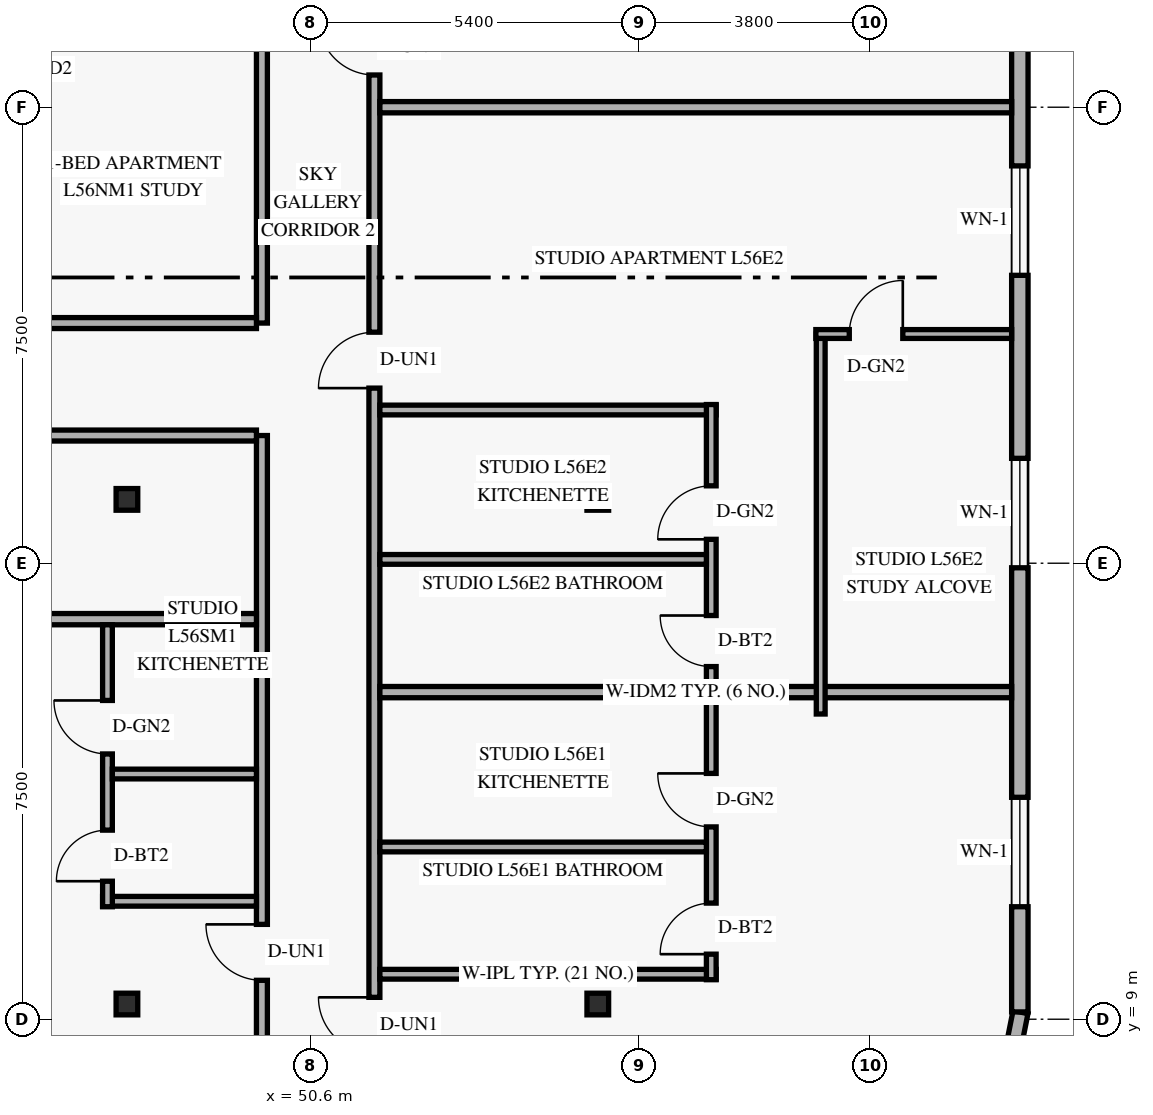
"""IFC4 building model, lengths in metres.
Left out: names, types, materials, properties, quantities, classifications, styles, units other than length and angle.
Written with IfcOpenShell. Run it as: python <this file> out.ifc"""

import sys

from ifc_helpers import new_model, si_unit, direction, frame, frame_2d, origin, origin_2d, place, context, subcontext, project, spatial, rectangle, hollow_rectangle, extrude, element, fill, save


model = new_model("IFC4")
c1 = context("Model", 3, precision=1e-05, world=origin(), true_north=direction((0.0, 1.0)))
c2 = subcontext(c1, "Body", "Model", "MODEL_VIEW")
j1 = project(units=[si_unit("LENGTHUNIT", "METRE"), si_unit("PLANEANGLEUNIT", "RADIAN")], contexts=[c1])
p1 = place(None, origin())
s1 = spatial("IfcSite", under=j1, at=p1, CompositionType="ELEMENT")
p2 = place(p1, origin())
s2 = spatial("IfcBuilding", under=s1, at=p2, CompositionType="ELEMENT")
p3 = place(p2, frame((0.0, 0.0, 216.6)))
s3 = spatial("IfcBuildingStorey", under=s2, at=p3, CompositionType="ELEMENT", Elevation=216.6)
for number, where, z_axis, x_axis in (
    (1, (47.517, 9.25, 0.0), (0.035, 0.0, 0.999), (0.0, 1.0, 0.0)),
    (2, (47.517, 17.55, 0.0), (0.035, 0.0, 0.999), (0.0, 1.0, 0.0)),
):
    element("IfcColumn", number, at=place(p3, frame(where, z_axis=z_axis, x_axis=x_axis)), inside=s3, PredefinedType="COLUMN", context=c2, shape_type="SweptSolid", body=[
        extrude(hollow_rectangle(XDim=0.356, YDim=0.356, WallThickness=0.016, at=origin_2d()), origin(), (0.0, 0.0, 1.0), 3.602),
    ])
for number, where, z_axis, x_axis in (
    (3, (55.219, 9.25, 0.0), (0.058, 0.0, 0.998), (0.0, 1.0, 0.0)),
    (4, (55.219, 17.55, 0.0), (0.058, 0.0, 0.998), (0.0, 1.0, 0.0)),
):
    element("IfcColumn", number, at=place(p3, frame(where, z_axis=z_axis, x_axis=x_axis)), inside=s3, PredefinedType="COLUMN", context=c2, shape_type="SweptSolid", body=[
        extrude(hollow_rectangle(XDim=0.356, YDim=0.356, WallThickness=0.016, at=origin_2d()), origin(), (0.0, 0.0, 1.0), 3.606),
    ])
p4 = place(p3, frame((62.005, 7.754, 0.0), z_axis=(0.0, 0.0, 1.0), x_axis=(0.195135625965, 0.9807762678, 0.0)))
e5 = element("IfcWall", 5, at=p4, inside=s3, PredefinedType="SOLIDWALL", context=c2, shape_type="SweptSolid", body=[
    extrude(rectangle(XDim=1.389, YDim=0.25, at=frame_2d((0.694, 0.0))), origin(), (0.0, 0.0, 1.0), 3.36),
])
p5 = place(p3, frame((62.265, 9.12, 0.0), z_axis=(0.0, 0.0, 1.0), x_axis=(0.0, 1.0, 0.0)))
e6 = element("IfcWall", 6, at=p5, inside=s3, PredefinedType="SOLIDWALL", context=c2, shape_type="SweptSolid", body=[
    extrude(rectangle(XDim=29.76, YDim=0.27, at=frame_2d((14.88, 0.0))), origin(), (0.0, 0.0, 1.0), 3.36),
])
p6 = place(p5, frame((1.73, 0.0, 0.85)))
e7 = element("IfcOpeningElement", 7, at=p6, cuts=e6, PredefinedType="OPENING", context=c2, shape_type="SweptSolid", body=[
    extrude(rectangle(XDim=1.8, YDim=1.6, at=frame_2d((0.9, 0.8))), frame((0.0, 0.145, 0.0), z_axis=(0.0, -1.0, 0.0), x_axis=(1.0, 0.0, 0.0)), (0.0, 0.0, 1.0), 0.29),
])
p7 = place(p5, frame((7.305, 0.0, 0.85)))
e8 = element("IfcOpeningElement", 8, at=p7, cuts=e6, PredefinedType="OPENING", context=c2, shape_type="SweptSolid", body=[
    extrude(rectangle(XDim=1.8, YDim=1.6, at=frame_2d((0.9, 0.8))), frame((0.0, 0.145, 0.0), z_axis=(0.0, -1.0, 0.0), x_axis=(1.0, 0.0, 0.0)), (0.0, 0.0, 1.0), 0.29),
])
p8 = place(p5, frame((12.115, 0.0, 0.85)))
e9 = element("IfcOpeningElement", 9, at=p8, cuts=e6, PredefinedType="OPENING", context=c2, shape_type="SweptSolid", body=[
    extrude(rectangle(XDim=1.8, YDim=1.6, at=frame_2d((0.9, 0.8))), frame((0.0, 0.145, 0.0), z_axis=(0.0, -1.0, 0.0), x_axis=(1.0, 0.0, 0.0)), (0.0, 0.0, 1.0), 0.29),
])
p9 = place(p5, frame((17.188, 0.0, 0.85)))
e10 = element("IfcOpeningElement", 10, at=p9, cuts=e6, PredefinedType="OPENING", context=c2, shape_type="SweptSolid", body=[
    extrude(rectangle(XDim=1.8, YDim=1.6, at=frame_2d((0.9, 0.8))), frame((0.0, 0.145, 0.0), z_axis=(0.0, -1.0, 0.0), x_axis=(1.0, 0.0, 0.0)), (0.0, 0.0, 1.0), 0.29),
])
p10 = place(p5, frame((21.997, 0.0, 0.85)))
e11 = element("IfcOpeningElement", 11, at=p10, cuts=e6, PredefinedType="OPENING", context=c2, shape_type="SweptSolid", body=[
    extrude(rectangle(XDim=1.8, YDim=1.6, at=frame_2d((0.9, 0.8))), frame((0.0, 0.145, 0.0), z_axis=(0.0, -1.0, 0.0), x_axis=(1.0, 0.0, 0.0)), (0.0, 0.0, 1.0), 0.29),
])
p11 = place(p5, frame((26.23, 0.0, 0.85)))
e12 = element("IfcOpeningElement", 12, at=p11, cuts=e6, PredefinedType="OPENING", context=c2, shape_type="SweptSolid", body=[
    extrude(rectangle(XDim=1.8, YDim=1.6, at=frame_2d((0.9, 0.8))), frame((0.0, 0.145, 0.0), z_axis=(0.0, -1.0, 0.0), x_axis=(1.0, 0.0, 0.0)), (0.0, 0.0, 1.0), 0.29),
])
p12 = place(p3, frame((49.8, 5.77, 0.0), z_axis=(0.0, 0.0, 1.0), x_axis=(0.0, 1.0, 0.0)))
e13 = element("IfcWall", 13, at=p12, inside=s3, PredefinedType="STANDARD", context=c2, shape_type="SweptSolid", body=[
    extrude(rectangle(XDim=12.83, YDim=0.18, at=frame_2d((6.415, 0.0))), origin(), (0.0, 0.0, 1.0), 2.803),
])
p13 = place(p12, frame((3.87, 0.0, 0.0)))
e14 = element("IfcOpeningElement", 14, at=p13, cuts=e13, PredefinedType="OPENING", context=c2, shape_type="SweptSolid", body=[
    extrude(rectangle(XDim=0.92, YDim=2.15, at=frame_2d((0.46, 1.075))), frame((0.0, 0.1, 0.0), z_axis=(0.0, -1.0, 0.0), x_axis=(1.0, 0.0, 0.0)), (0.0, 0.0, 1.0), 0.2),
])
p14 = place(p3, frame((49.8, 20.45, 0.0), z_axis=(0.0, 0.0, 1.0), x_axis=(0.0, 1.0, 0.0)))
e15 = element("IfcWall", 15, at=p14, inside=s3, PredefinedType="STANDARD", context=c2, shape_type="SweptSolid", body=[
    extrude(rectangle(XDim=21.78, YDim=0.18, at=frame_2d((10.89, 0.0))), origin(), (0.0, 0.0, 1.0), 2.803),
])
p15 = place(p14, frame((15.9, 0.0, 0.0)))
e16 = element("IfcOpeningElement", 16, at=p15, cuts=e15, PredefinedType="OPENING", context=c2, shape_type="SweptSolid", body=[
    extrude(rectangle(XDim=0.92, YDim=2.15, at=frame_2d((0.46, 1.075))), frame((0.0, 0.1, 0.0), z_axis=(0.0, -1.0, 0.0), x_axis=(1.0, 0.0, 0.0)), (0.0, 0.0, 1.0), 0.2),
])
p16 = place(p3, frame((37.64, 18.6, 0.0), z_axis=(0.0, 0.0, 1.0), x_axis=(1.0, 0.0, 0.0)))
e17 = element("IfcWall", 17, at=p16, inside=s3, PredefinedType="STANDARD", context=c2, shape_type="SweptSolid", body=[
    extrude(rectangle(XDim=12.07, YDim=0.18, at=frame_2d((6.035, 0.0))), origin(), (0.0, 0.0, 1.0), 2.803),
])
p17 = place(p3, frame((37.64, 20.45, 0.0), z_axis=(0.0, 0.0, 1.0), x_axis=(1.0, 0.0, 0.0)))
e18 = element("IfcWall", 18, at=p17, inside=s3, PredefinedType="STANDARD", context=c2, shape_type="SweptSolid", body=[
    extrude(rectangle(XDim=12.07, YDim=0.18, at=frame_2d((6.035, 0.0))), origin(), (0.0, 0.0, 1.0), 2.803),
])
p18 = place(p17, frame((0.32, 0.0, 0.0)))
e19 = element("IfcOpeningElement", 19, at=p18, cuts=e18, PredefinedType="OPENING", context=c2, shape_type="SweptSolid", body=[
    extrude(rectangle(XDim=0.92, YDim=2.15, at=frame_2d((0.46, 1.075))), frame((0.0, 0.1, 0.0), z_axis=(0.0, -1.0, 0.0), x_axis=(1.0, 0.0, 0.0)), (0.0, 0.0, 1.0), 0.2),
])
p19 = place(p3, frame((51.65, 5.77, 0.0), z_axis=(0.0, 0.0, 1.0), x_axis=(0.0, 1.0, 0.0)))
e20 = element("IfcWall", 20, at=p19, inside=s3, PredefinedType="STANDARD", context=c2, shape_type="SweptSolid", body=[
    extrude(rectangle(XDim=36.46, YDim=0.18, at=frame_2d((18.23, 0.0))), origin(), (0.0, 0.0, 1.0), 2.803),
])
p20 = place(p19, frame((2.67, 0.0, 0.0)))
e21 = element("IfcOpeningElement", 21, at=p20, cuts=e20, PredefinedType="OPENING", context=c2, shape_type="SweptSolid", body=[
    extrude(rectangle(XDim=0.92, YDim=2.15, at=frame_2d((0.46, 1.075))), frame((0.0, 0.1, 0.0), z_axis=(0.0, -1.0, 0.0), x_axis=(1.0, 0.0, 0.0)), (0.0, 0.0, 1.0), 0.2),
])
p21 = place(p19, frame((13.61, 0.0, 0.0)))
e22 = element("IfcOpeningElement", 22, at=p21, cuts=e20, PredefinedType="OPENING", context=c2, shape_type="SweptSolid", body=[
    extrude(rectangle(XDim=0.92, YDim=2.15, at=frame_2d((0.46, 1.075))), frame((0.0, 0.1, 0.0), z_axis=(0.0, -1.0, 0.0), x_axis=(1.0, 0.0, 0.0)), (0.0, 0.0, 1.0), 0.2),
])
p22 = place(p19, frame((18.76, 0.0, 0.0)))
e23 = element("IfcOpeningElement", 23, at=p22, cuts=e20, PredefinedType="OPENING", context=c2, shape_type="SweptSolid", body=[
    extrude(rectangle(XDim=0.92, YDim=2.15, at=frame_2d((0.46, 1.075))), frame((0.0, 0.1, 0.0), z_axis=(0.0, -1.0, 0.0), x_axis=(1.0, 0.0, 0.0)), (0.0, 0.0, 1.0), 0.2),
])
p23 = place(p19, frame((32.75, 0.0, 0.0)))
e24 = element("IfcOpeningElement", 24, at=p23, cuts=e20, PredefinedType="OPENING", context=c2, shape_type="SweptSolid", body=[
    extrude(rectangle(XDim=0.92, YDim=2.15, at=frame_2d((0.46, 1.075))), frame((0.0, 0.1, 0.0), z_axis=(0.0, -1.0, 0.0), x_axis=(1.0, 0.0, 0.0)), (0.0, 0.0, 1.0), 0.2),
])
p24 = place(p3, frame((51.74, 9.74, 0.0), z_axis=(0.0, 0.0, 1.0), x_axis=(1.0, 0.0, 0.0)))
e25 = element("IfcWall", 25, at=p24, inside=s3, PredefinedType="PLUMBINGWALL", context=c2, shape_type="SweptSolid", body=[
    extrude(rectangle(XDim=5.53, YDim=0.16, at=frame_2d((2.765, 0.0))), origin(), (0.0, 0.0, 1.0), 2.879),
])
p25 = place(p3, frame((57.19, 9.65, 0.0), z_axis=(0.0, 0.0, 1.0), x_axis=(0.0, 1.0, 0.0)))
e26 = element("IfcWall", 26, at=p25, inside=s3, PredefinedType="PLUMBINGWALL", context=c2, shape_type="SweptSolid", body=[
    extrude(rectangle(XDim=4.73, YDim=0.16, at=frame_2d((2.365, 0.0))), origin(), (0.0, 0.0, 1.0), 3.36),
])
p26 = place(p25, frame((0.42, 0.0, 0.0)))
e27 = element("IfcOpeningElement", 27, at=p26, cuts=e26, PredefinedType="OPENING", context=c2, shape_type="SweptSolid", body=[
    extrude(rectangle(XDim=0.84, YDim=2.12, at=frame_2d((0.42, 1.06))), frame((0.0, 0.09, 0.0), z_axis=(0.0, -1.0, 0.0), x_axis=(1.0, 0.0, 0.0)), (0.0, 0.0, 1.0), 0.18),
])
p27 = place(p25, frame((2.513, 0.0, 0.0)))
e28 = element("IfcOpeningElement", 28, at=p27, cuts=e26, PredefinedType="OPENING", context=c2, shape_type="SweptSolid", body=[
    extrude(rectangle(XDim=0.88, YDim=2.12, at=frame_2d((0.44, 1.06))), frame((0.0, 0.09, 0.0), z_axis=(0.0, -1.0, 0.0), x_axis=(1.0, 0.0, 0.0)), (0.0, 0.0, 1.0), 0.18),
])
p28 = place(p3, frame((51.74, 11.833, 0.0), z_axis=(0.0, 0.0, 1.0), x_axis=(1.0, 0.0, 0.0)))
e29 = element("IfcWall", 29, at=p28, inside=s3, PredefinedType="PLUMBINGWALL", context=c2, shape_type="SweptSolid", body=[
    extrude(rectangle(XDim=5.37, YDim=0.16, at=frame_2d((2.685, 0.0))), origin(), (0.0, 0.0, 1.0), 2.879),
])
p29 = place(p3, frame((51.74, 14.38, 0.0), z_axis=(0.0, 0.0, 1.0), x_axis=(1.0, 0.0, 0.0)))
e30 = element("IfcWall", 30, at=p29, inside=s3, PredefinedType="PARTITIONING", context=c2, shape_type="SweptSolid", body=[
    extrude(rectangle(XDim=10.39, YDim=0.185, at=frame_2d((5.195, 0.0))), origin(), (0.0, 0.0, 1.0), 2.879),
])
p30 = place(p3, frame((51.74, 19.02, 0.0), z_axis=(0.0, 0.0, 1.0), x_axis=(1.0, 0.0, 0.0)))
e31 = element("IfcWall", 31, at=p30, inside=s3, PredefinedType="PLUMBINGWALL", context=c2, shape_type="SweptSolid", body=[
    extrude(rectangle(XDim=5.53, YDim=0.16, at=frame_2d((2.765, 0.0))), origin(), (0.0, 0.0, 1.0), 2.879),
])
p31 = place(p3, frame((57.19, 14.472, 0.0), z_axis=(0.0, 0.0, 1.0), x_axis=(0.0, 1.0, 0.0)))
e32 = element("IfcWall", 32, at=p31, inside=s3, PredefinedType="PLUMBINGWALL", context=c2, shape_type="SweptSolid", body=[
    extrude(rectangle(XDim=4.638, YDim=0.16, at=frame_2d((2.319, 0.0))), origin(), (0.0, 0.0, 1.0), 3.36),
])
p32 = place(p31, frame((0.327, 0.0, 0.0)))
e33 = element("IfcOpeningElement", 33, at=p32, cuts=e32, PredefinedType="OPENING", context=c2, shape_type="SweptSolid", body=[
    extrude(rectangle(XDim=0.84, YDim=2.12, at=frame_2d((0.42, 1.06))), frame((0.0, 0.09, 0.0), z_axis=(0.0, -1.0, 0.0), x_axis=(1.0, 0.0, 0.0)), (0.0, 0.0, 1.0), 0.18),
])
p33 = place(p31, frame((2.42, 0.0, 0.0)))
e34 = element("IfcOpeningElement", 34, at=p33, cuts=e32, PredefinedType="OPENING", context=c2, shape_type="SweptSolid", body=[
    extrude(rectangle(XDim=0.88, YDim=2.12, at=frame_2d((0.44, 1.06))), frame((0.0, 0.09, 0.0), z_axis=(0.0, -1.0, 0.0), x_axis=(1.0, 0.0, 0.0)), (0.0, 0.0, 1.0), 0.18),
])
p34 = place(p3, frame((51.74, 16.563, 0.0), z_axis=(0.0, 0.0, 1.0), x_axis=(1.0, 0.0, 0.0)))
e35 = element("IfcWall", 35, at=p34, inside=s3, PredefinedType="PLUMBINGWALL", context=c2, shape_type="SweptSolid", body=[
    extrude(rectangle(XDim=5.37, YDim=0.16, at=frame_2d((2.685, 0.0))), origin(), (0.0, 0.0, 1.0), 2.879),
])
p35 = place(p3, frame((58.99, 14.02, 0.0), z_axis=(0.0, 0.0, 1.0), x_axis=(0.0, 1.0, 0.0)))
e36 = element("IfcWall", 36, at=p35, inside=s3, PredefinedType="PARTITIONING", context=c2, shape_type="SweptSolid", body=[
    extrude(rectangle(XDim=6.25, YDim=0.145, at=frame_2d((3.125, 0.0))), origin(), (0.0, 0.0, 1.0), 3.36),
])
p36 = place(p3, frame((58.91, 20.27, 0.0), z_axis=(0.0, 0.0, 1.0), x_axis=(1.0, 0.0, 0.0)))
e37 = element("IfcWall", 37, at=p36, inside=s3, PredefinedType="PARTITIONING", context=c2, shape_type="SweptSolid", body=[
    extrude(rectangle(XDim=3.22, YDim=0.145, at=frame_2d((1.61, 0.0))), origin(), (0.0, 0.0, 1.0), 3.36),
])
p37 = place(p36, frame((0.55, 0.0, 0.0)))
e38 = element("IfcOpeningElement", 38, at=p37, cuts=e37, PredefinedType="OPENING", context=c2, shape_type="SweptSolid", body=[
    extrude(rectangle(XDim=0.88, YDim=2.12, at=frame_2d((0.44, 1.06))), frame((0.0, 0.083, 0.0), z_axis=(0.0, -1.0, 0.0), x_axis=(1.0, 0.0, 0.0)), (0.0, 0.0, 1.0), 0.165),
])
p38 = place(p3, frame((51.74, 24.0, 0.0), z_axis=(0.0, 0.0, 1.0), x_axis=(1.0, 0.0, 0.0)))
e39 = element("IfcWall", 39, at=p38, inside=s3, PredefinedType="PARTITIONING", context=c2, shape_type="SweptSolid", body=[
    extrude(rectangle(XDim=10.39, YDim=0.185, at=frame_2d((5.195, 0.0))), origin(), (0.0, 0.0, 1.0), 2.879),
])
p39 = place(p3, frame((38.022, 15.58, 0.0), z_axis=(0.0, 0.0, 1.0), x_axis=(1.0, 0.0, 0.0)))
e40 = element("IfcWall", 40, at=p39, inside=s3, PredefinedType="PARTITIONING", context=c2, shape_type="SweptSolid", body=[
    extrude(rectangle(XDim=11.688, YDim=0.185, at=frame_2d((5.844, 0.0))), origin(), (0.0, 0.0, 1.0), 2.803),
])
p40 = place(p3, frame((47.18, 10.94, 0.0), z_axis=(0.0, 0.0, 1.0), x_axis=(1.0, 0.0, 0.0)))
e41 = element("IfcWall", 41, at=p40, inside=s3, PredefinedType="PLUMBINGWALL", context=c2, shape_type="SweptSolid", body=[
    extrude(rectangle(XDim=2.53, YDim=0.16, at=frame_2d((1.265, 0.0))), origin(), (0.0, 0.0, 1.0), 2.803),
])
p41 = place(p3, frame((47.26, 10.85, 0.0), z_axis=(0.0, 0.0, 1.0), x_axis=(0.0, 1.0, 0.0)))
e42 = element("IfcWall", 42, at=p41, inside=s3, PredefinedType="PLUMBINGWALL", context=c2, shape_type="SweptSolid", body=[
    extrude(rectangle(XDim=4.637, YDim=0.16, at=frame_2d((2.319, 0.0))), origin(), (0.0, 0.0, 1.0), 3.039),
])
p42 = place(p41, frame((0.42, 0.0, 0.0)))
e43 = element("IfcOpeningElement", 43, at=p42, cuts=e42, PredefinedType="OPENING", context=c2, shape_type="SweptSolid", body=[
    extrude(rectangle(XDim=0.84, YDim=2.12, at=frame_2d((0.42, 1.06))), frame((0.0, 0.09, 0.0), z_axis=(0.0, -1.0, 0.0), x_axis=(1.0, 0.0, 0.0)), (0.0, 0.0, 1.0), 0.18),
])
p43 = place(p41, frame((2.513, 0.0, 0.0)))
e44 = element("IfcOpeningElement", 44, at=p43, cuts=e42, PredefinedType="OPENING", context=c2, shape_type="SweptSolid", body=[
    extrude(rectangle(XDim=0.88, YDim=2.12, at=frame_2d((0.44, 1.06))), frame((0.0, 0.09, 0.0), z_axis=(0.0, -1.0, 0.0), x_axis=(1.0, 0.0, 0.0)), (0.0, 0.0, 1.0), 0.18),
])
p44 = place(p3, frame((47.34, 13.033, 0.0), z_axis=(0.0, 0.0, 1.0), x_axis=(1.0, 0.0, 0.0)))
e45 = element("IfcWall", 45, at=p44, inside=s3, PredefinedType="PLUMBINGWALL", context=c2, shape_type="SweptSolid", body=[
    extrude(rectangle(XDim=2.37, YDim=0.16, at=frame_2d((1.185, 0.0))), origin(), (0.0, 0.0, 1.0), 2.803),
])
p45 = place(p6, origin())
e46 = element("IfcWindow", 46, at=p45, inside=s3, PartitioningType="SINGLE_PANEL", PredefinedType="WINDOW", context=c2, shape_type="SweptSolid", body=[
    extrude(rectangle(XDim=1.8, YDim=1.6, at=frame_2d((0.9, 0.8))), frame((0.0, 0.03, 0.0), z_axis=(0.0, -1.0, 0.0), x_axis=(1.0, 0.0, 0.0)), (0.0, 0.0, 1.0), 0.06),
])
fill(e7, e46)
p46 = place(p7, origin())
e47 = element("IfcWindow", 47, at=p46, inside=s3, PartitioningType="SINGLE_PANEL", PredefinedType="WINDOW", context=c2, shape_type="SweptSolid", body=[
    extrude(rectangle(XDim=1.8, YDim=1.6, at=frame_2d((0.9, 0.8))), frame((0.0, 0.03, 0.0), z_axis=(0.0, -1.0, 0.0), x_axis=(1.0, 0.0, 0.0)), (0.0, 0.0, 1.0), 0.06),
])
fill(e8, e47)
p47 = place(p8, origin())
e48 = element("IfcWindow", 48, at=p47, inside=s3, PartitioningType="SINGLE_PANEL", PredefinedType="WINDOW", context=c2, shape_type="SweptSolid", body=[
    extrude(rectangle(XDim=1.8, YDim=1.6, at=frame_2d((0.9, 0.8))), frame((0.0, 0.03, 0.0), z_axis=(0.0, -1.0, 0.0), x_axis=(1.0, 0.0, 0.0)), (0.0, 0.0, 1.0), 0.06),
])
fill(e9, e48)
p48 = place(p20, origin())
e49 = element("IfcDoor", 49, at=p48, inside=s3, OperationType="SINGLE_SWING_RIGHT", PredefinedType="DOOR", context=c2, shape_type="SweptSolid", body=[
    extrude(rectangle(XDim=0.92, YDim=2.15, at=frame_2d((0.46, 1.075))), frame((0.0, 0.025, 0.0), z_axis=(0.0, -1.0, 0.0), x_axis=(1.0, 0.0, 0.0)), (0.0, 0.0, 1.0), 0.05),
])
fill(e21, e49)
p49 = place(p26, origin())
e50 = element("IfcDoor", 50, at=p49, inside=s3, OperationType="SINGLE_SWING_LEFT", PredefinedType="DOOR", context=c2, shape_type="SweptSolid", body=[
    extrude(rectangle(XDim=0.84, YDim=2.12, at=frame_2d((0.42, 1.06))), frame((0.0, 0.025, 0.0), z_axis=(0.0, -1.0, 0.0), x_axis=(1.0, 0.0, 0.0)), (0.0, 0.0, 1.0), 0.05),
])
fill(e27, e50)
p50 = place(p27, origin())
e51 = element("IfcDoor", 51, at=p50, inside=s3, OperationType="SINGLE_SWING_RIGHT", PredefinedType="DOOR", context=c2, shape_type="SweptSolid", body=[
    extrude(rectangle(XDim=0.88, YDim=2.12, at=frame_2d((0.44, 1.06))), frame((0.0, 0.025, 0.0), z_axis=(0.0, -1.0, 0.0), x_axis=(1.0, 0.0, 0.0)), (0.0, 0.0, 1.0), 0.05),
])
fill(e28, e51)
p51 = place(p37, origin())
e52 = element("IfcDoor", 52, at=p51, inside=s3, OperationType="SINGLE_SWING_RIGHT", PredefinedType="DOOR", context=c2, shape_type="SweptSolid", body=[
    extrude(rectangle(XDim=0.88, YDim=2.12, at=frame_2d((0.44, 1.06))), frame((0.0, 0.025, 0.0), z_axis=(0.0, -1.0, 0.0), x_axis=(1.0, 0.0, 0.0)), (0.0, 0.0, 1.0), 0.05),
])
fill(e38, e52)
p52 = place(p21, origin())
e53 = element("IfcDoor", 53, at=p52, inside=s3, OperationType="SINGLE_SWING_LEFT", PredefinedType="DOOR", context=c2, shape_type="SweptSolid", body=[
    extrude(rectangle(XDim=0.92, YDim=2.15, at=frame_2d((0.46, 1.075))), frame((0.0, 0.025, 0.0), z_axis=(0.0, -1.0, 0.0), x_axis=(1.0, 0.0, 0.0)), (0.0, 0.0, 1.0), 0.05),
])
fill(e22, e53)
p53 = place(p32, origin())
e54 = element("IfcDoor", 54, at=p53, inside=s3, OperationType="SINGLE_SWING_RIGHT", PredefinedType="DOOR", context=c2, shape_type="SweptSolid", body=[
    extrude(rectangle(XDim=0.84, YDim=2.12, at=frame_2d((0.42, 1.06))), frame((0.0, 0.025, 0.0), z_axis=(0.0, -1.0, 0.0), x_axis=(1.0, 0.0, 0.0)), (0.0, 0.0, 1.0), 0.05),
])
fill(e33, e54)
p54 = place(p33, origin())
e55 = element("IfcDoor", 55, at=p54, inside=s3, OperationType="SINGLE_SWING_LEFT", PredefinedType="DOOR", context=c2, shape_type="SweptSolid", body=[
    extrude(rectangle(XDim=0.88, YDim=2.12, at=frame_2d((0.44, 1.06))), frame((0.0, 0.025, 0.0), z_axis=(0.0, -1.0, 0.0), x_axis=(1.0, 0.0, 0.0)), (0.0, 0.0, 1.0), 0.05),
])
fill(e34, e55)
p55 = place(p22, origin())
e56 = element("IfcDoor", 56, at=p55, inside=s3, OperationType="SINGLE_SWING_RIGHT", PredefinedType="DOOR", context=c2, shape_type="SweptSolid", body=[
    extrude(rectangle(XDim=0.92, YDim=2.15, at=frame_2d((0.46, 1.075))), frame((0.0, 0.025, 0.0), z_axis=(0.0, -1.0, 0.0), x_axis=(1.0, 0.0, 0.0)), (0.0, 0.0, 1.0), 0.05),
])
fill(e23, e56)
p56 = place(p13, origin())
e57 = element("IfcDoor", 57, at=p56, inside=s3, OperationType="SINGLE_SWING_RIGHT", PredefinedType="DOOR", context=c2, shape_type="SweptSolid", body=[
    extrude(rectangle(XDim=0.92, YDim=2.15, at=frame_2d((0.46, 1.075))), frame((0.0, 0.025, 0.0), z_axis=(0.0, -1.0, 0.0), x_axis=(1.0, 0.0, 0.0)), (0.0, 0.0, 1.0), 0.05),
])
fill(e14, e57)
p57 = place(p42, origin())
e58 = element("IfcDoor", 58, at=p57, inside=s3, OperationType="SINGLE_SWING_LEFT", PredefinedType="DOOR", context=c2, shape_type="SweptSolid", body=[
    extrude(rectangle(XDim=0.84, YDim=2.12, at=frame_2d((0.42, 1.06))), frame((0.0, 0.025, 0.0), z_axis=(0.0, -1.0, 0.0), x_axis=(1.0, 0.0, 0.0)), (0.0, 0.0, 1.0), 0.05),
])
fill(e43, e58)
p58 = place(p43, origin())
e59 = element("IfcDoor", 59, at=p58, inside=s3, OperationType="SINGLE_SWING_RIGHT", PredefinedType="DOOR", context=c2, shape_type="SweptSolid", body=[
    extrude(rectangle(XDim=0.88, YDim=2.12, at=frame_2d((0.44, 1.06))), frame((0.0, 0.025, 0.0), z_axis=(0.0, -1.0, 0.0), x_axis=(1.0, 0.0, 0.0)), (0.0, 0.0, 1.0), 0.05),
])
fill(e44, e59)
save(model, sys.argv[1])
